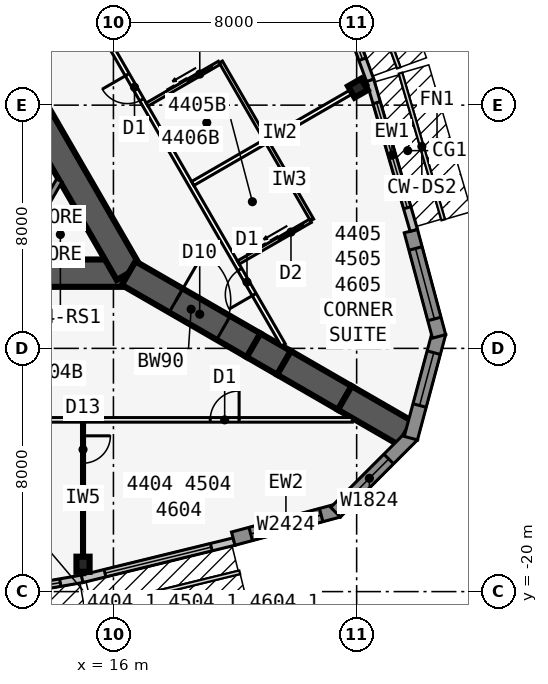
"""IFC4 building model, lengths in metres.
Left out: names, types, materials, properties, quantities, classifications, styles, units other than length and angle.
Written with IfcOpenShell. Run it as: python <this file> out.ifc"""

import sys

from ifc_helpers import new_model, si_unit, direction, frame, frame_2d, origin, origin_2d, place, context, subcontext, project, spatial, polyline, rectangle, i_section, outline, extrude, element, fill, save


model = new_model("IFC4")
c1 = context("Model", 3, precision=1e-05, world=origin(), true_north=direction((0.0, 1.0)))
c2 = subcontext(c1, "Body", "Model", "MODEL_VIEW")
j1 = project(units=[si_unit("LENGTHUNIT", "METRE"), si_unit("PLANEANGLEUNIT", "RADIAN")], contexts=[c1])
p1 = place(None, origin())
s1 = spatial("IfcSite", under=j1, at=p1, CompositionType="ELEMENT")
p2 = place(p1, origin())
s2 = spatial("IfcBuilding", under=s1, at=p2, CompositionType="ELEMENT")
p3 = place(p2, frame((0.0, 0.0, 165.7)))
s3 = spatial("IfcBuildingStorey", under=s2, at=p3, CompositionType="ELEMENT", Elevation=165.7)
p4 = place(p3, frame((-16.5, -9.526, 0.0), z_axis=(0.0, 0.0, 1.0), x_axis=(1.0, 0.0, 0.0)))
e1 = element("IfcWall", 1, at=p4, inside=s3, PredefinedType="SHEAR", context=c2, shape_type="SweptSolid", body=[
    extrude(rectangle(XDim=33.0, YDim=0.9, at=frame_2d((16.5, 0.0))), origin(), (0.0, 0.0, 1.0), 3.4),
])
p5 = place(p4, frame((14.05, 0.0, 0.0)))
e2 = element("IfcOpeningElement", 2, at=p5, cuts=e1, PredefinedType="OPENING", context=c2, shape_type="SweptSolid", body=[
    extrude(rectangle(XDim=1.8, YDim=2.13, at=frame_2d((0.9, 1.065))), frame((0.0, 0.46, 0.0), z_axis=(0.0, -1.0, 0.0), x_axis=(1.0, 0.0, 0.0)), (0.0, 0.0, 1.0), 0.92),
])
p6 = place(p3, frame((16.5, -9.526, 0.0), z_axis=(0.0, 0.0, 1.0), x_axis=(-0.499999749417, 0.866025548458, 0.0)))
e3 = element("IfcWall", 3, at=p6, inside=s3, PredefinedType="SHEAR", context=c2, shape_type="SweptSolid", body=[
    extrude(rectangle(XDim=33.0, YDim=0.9, at=frame_2d((16.5, 0.0))), origin(), (0.0, 0.0, 1.0), 3.4),
])
p7 = place(p6, frame((14.15, 0.0, 0.0)))
e4 = element("IfcOpeningElement", 4, at=p7, cuts=e3, PredefinedType="OPENING", context=c2, shape_type="SweptSolid", body=[
    extrude(rectangle(XDim=1.8, YDim=2.13, at=frame_2d((0.9, 1.065))), frame((0.0, 0.46, 0.0), z_axis=(0.0, -1.0, 0.0), x_axis=(1.0, 0.0, 0.0)), (0.0, 0.0, 1.0), 0.92),
])
p8 = place(p6, frame((12.6, 0.0, 0.0)))
e5 = element("IfcOpeningElement", 5, at=p8, cuts=e3, PredefinedType="OPENING", context=c2, shape_type="SweptSolid", body=[
    extrude(rectangle(XDim=1.0, YDim=2.13, at=frame_2d((0.5, 1.065))), frame((0.0, 0.46, 0.0), z_axis=(0.0, -1.0, 0.0), x_axis=(1.0, 0.0, 0.0)), (0.0, 0.0, 1.0), 0.92),
])
p9 = place(p3, frame((16.5, -9.526, 0.0), z_axis=(0.0, 0.0, 1.0), x_axis=(0.866031398331, -0.499989616998, 0.0)))
e6 = element("IfcWall", 6, at=p9, inside=s3, PredefinedType="SHEAR", context=c2, shape_type="SweptSolid", body=[
    extrude(rectangle(XDim=4.746, YDim=0.9, at=frame_2d((2.373, 0.0))), origin(), (0.0, 0.0, 1.0), 3.4),
])
p10 = place(p9, frame((1.8, 0.0, 0.0)))
e7 = element("IfcOpeningElement", 7, at=p10, cuts=e6, PredefinedType="OPENING", context=c2, shape_type="SweptSolid", body=[
    extrude(rectangle(XDim=1.8, YDim=2.13, at=frame_2d((0.9, 1.065))), frame((0.0, 0.46, 0.0), z_axis=(0.0, -1.0, 0.0), x_axis=(1.0, 0.0, 0.0)), (0.0, 0.0, 1.0), 0.92),
])
p11 = place(p3, frame((20.61, -11.899, 0.0), z_axis=(0.0, 0.0, 1.0), x_axis=(0.866009537788, -0.500027479704, 0.0)))
e8 = element("IfcWall", 8, at=p11, inside=s3, PredefinedType="SHEAR", context=c2, shape_type="SweptSolid", body=[
    extrude(rectangle(XDim=1.155, YDim=0.9, at=frame_2d((0.577, 0.0))), origin(), (0.0, 0.0, 1.0), 3.4),
])
for number, where, z_axis, x_axis in (
    (9, (21.61, -12.477, 0.0), (0.0, 0.0, 1.0), (0.866, -0.5, 0.0)),
    (10, (23.61, -13.631, 0.0), (0.0, 0.0, 1.0), (0.866, -0.5, 0.0)),
):
    element("IfcWall", number, at=place(p3, frame(where, z_axis=z_axis, x_axis=x_axis)), inside=s3, PredefinedType="SHEAR", context=c2, shape_type="SweptSolid", body=[
        extrude(rectangle(XDim=2.309, YDim=0.9, at=frame_2d((1.155, 0.0))), origin(), (0.0, 0.0, 1.0), 3.4),
    ])
for number, where, z_axis, x_axis in (
    (11, (15.0, -19.1, 0.0), (0.0, 0.0, 1.0), (1.0, 0.0, 0.0)),
    (12, (24.041, -3.44, 0.0), (0.0, 0.0, 1.0), (-0.5, 0.866, 0.0)),
):
    element("IfcColumn", number, at=place(p3, frame(where, z_axis=z_axis, x_axis=x_axis)), inside=s3, PredefinedType="COLUMN", context=c2, shape_type="SweptSolid", body=[
        extrude(i_section(OverallWidth=0.432, OverallDepth=0.498, WebThickness=0.056, FlangeThickness=0.089, at=origin_2d()), origin(), (0.0, 0.0, 1.0), 3.4),
    ])
p12 = place(p3, frame((9.979, -20.452, 0.0), z_axis=(0.0, 0.0, 1.0), x_axis=(0.985030467156, 0.172380331752, 0.0)))
e13 = element("IfcWall", 13, at=p12, inside=s3, PredefinedType="STANDARD", context=c2, shape_type="SweptSolid", body=[
    extrude(rectangle(XDim=5.076, YDim=0.25, at=frame_2d((2.538, 0.0))), origin(), (0.0, 0.0, 1.0), 3.235),
])
p13 = place(p12, frame((0.738, 0.0, 0.45)))
e14 = element("IfcOpeningElement", 14, at=p13, cuts=e13, PredefinedType="OPENING", context=c2, shape_type="SweptSolid", body=[
    extrude(rectangle(XDim=3.6, YDim=2.4, at=frame_2d((1.8, 1.2))), frame((0.0, 0.135, 0.0), z_axis=(0.0, -1.0, 0.0), x_axis=(1.0, 0.0, 0.0)), (0.0, 0.0, 1.0), 0.27),
])
p14 = place(p3, frame((14.97, -19.579, 0.0), z_axis=(0.0, 0.0, 1.0), x_axis=(0.971270024053, 0.237980126011, 0.0)))
e15 = element("IfcWall", 15, at=p14, inside=s3, PredefinedType="STANDARD", context=c2, shape_type="SweptSolid", body=[
    extrude(rectangle(XDim=5.148, YDim=0.25, at=frame_2d((2.574, 0.0))), origin(), (0.0, 0.0, 1.0), 3.235),
])
p15 = place(p14, frame((0.774, 0.0, 0.45)))
e16 = element("IfcOpeningElement", 16, at=p15, cuts=e15, PredefinedType="OPENING", context=c2, shape_type="SweptSolid", body=[
    extrude(rectangle(XDim=3.6, YDim=2.4, at=frame_2d((1.8, 1.2))), frame((0.0, 0.135, 0.0), z_axis=(0.0, -1.0, 0.0), x_axis=(1.0, 0.0, 0.0)), (0.0, 0.0, 1.0), 0.27),
])
p16 = place(p3, frame((19.942, -18.258, 0.0), z_axis=(0.0, 0.0, 1.0), x_axis=(0.965924653531, 0.258823421857, 0.0)))
e17 = element("IfcWall", 17, at=p16, inside=s3, PredefinedType="SOLIDWALL", context=c2, shape_type="SweptSolid", body=[
    extrude(rectangle(XDim=3.586, YDim=0.45, at=frame_2d((1.793, 0.0))), origin(), (0.0, 0.0, 1.0), 3.235),
])
p17 = place(p16, frame((0.593, 0.0, 0.45)))
e18 = element("IfcOpeningElement", 18, at=p17, cuts=e17, PredefinedType="OPENING", context=c2, shape_type="SweptSolid", body=[
    extrude(rectangle(XDim=2.4, YDim=2.4, at=frame_2d((1.2, 1.2))), frame((0.0, 0.235, 0.0), z_axis=(0.0, -1.0, 0.0), x_axis=(1.0, 0.0, 0.0)), (0.0, 0.0, 1.0), 0.47),
])
p18 = place(p3, frame((23.305, -17.388, 0.0), z_axis=(0.0, 0.0, 1.0), x_axis=(0.707106781187, 0.707106781187, 0.0)))
e19 = element("IfcWall", 19, at=p18, inside=s3, PredefinedType="SOLIDWALL", context=c2, shape_type="SweptSolid", body=[
    extrude(outline(polyline([(3.586, 0.225), (3.527, 0.225), (3.035, 0.093), (3.0, 0.225), (0.0, 0.225), (0.0, -0.225), (3.586, -0.225), (3.586, 0.225)])), origin(), (0.0, 0.0, 1.0), 3.235),
])
p19 = place(p18, frame((0.675, 0.0, 0.45)))
e20 = element("IfcOpeningElement", 20, at=p19, cuts=e19, PredefinedType="OPENING", context=c2, shape_type="SweptSolid", body=[
    extrude(rectangle(XDim=1.8, YDim=2.4, at=frame_2d((0.9, 1.2))), frame((0.0, 0.235, 0.0), z_axis=(0.0, -1.0, 0.0), x_axis=(1.0, 0.0, 0.0)), (0.0, 0.0, 1.0), 0.47),
])
p20 = place(p3, frame((25.783, -14.953, 0.0), z_axis=(0.0, 0.0, 1.0), x_axis=(0.258823421857, 0.965924653531, 0.0)))
e21 = element("IfcWall", 21, at=p20, inside=s3, PredefinedType="SOLIDWALL", context=c2, shape_type="SweptSolid", body=[
    extrude(outline(polyline([(3.586, 0.225), (0.586, 0.225), (0.551, 0.093), (0.06, 0.225), (0.0, 0.225), (0.0, -0.225), (3.586, -0.225), (3.586, 0.225)])), origin(), (0.0, 0.0, 1.0), 3.235),
])
p21 = place(p20, frame((1.111, 0.0, 0.45)))
e22 = element("IfcOpeningElement", 22, at=p21, cuts=e21, PredefinedType="OPENING", context=c2, shape_type="SweptSolid", body=[
    extrude(rectangle(XDim=1.8, YDim=2.4, at=frame_2d((0.9, 1.2))), frame((0.0, 0.235, 0.0), z_axis=(0.0, -1.0, 0.0), x_axis=(1.0, 0.0, 0.0)), (0.0, 0.0, 1.0), 0.47),
])
p22 = place(p3, frame((26.711, -11.605, 0.0), z_axis=(0.0, 0.0, 1.0), x_axis=(-0.258823421857, 0.965924653531, 0.0)))
e23 = element("IfcWall", 23, at=p22, inside=s3, PredefinedType="SOLIDWALL", context=c2, shape_type="SweptSolid", body=[
    extrude(rectangle(XDim=3.586, YDim=0.45, at=frame_2d((1.793, 0.0))), origin(), (0.0, 0.0, 1.0), 3.235),
])
p23 = place(p22, frame((0.593, 0.0, 0.45)))
e24 = element("IfcOpeningElement", 24, at=p23, cuts=e23, PredefinedType="OPENING", context=c2, shape_type="SweptSolid", body=[
    extrude(rectangle(XDim=2.4, YDim=2.4, at=frame_2d((1.2, 1.2))), frame((0.0, 0.235, 0.0), z_axis=(0.0, -1.0, 0.0), x_axis=(1.0, 0.0, 0.0)), (0.0, 0.0, 1.0), 0.47),
])
p24 = place(p3, frame((25.88, -8.118, 0.0), z_axis=(0.0, 0.0, 1.0), x_axis=(-0.279528287117, 0.960137457191, 0.0)))
e25 = element("IfcWall", 25, at=p24, inside=s3, PredefinedType="STANDARD", context=c2, shape_type="SweptSolid", body=[
    extrude(rectangle(XDim=5.148, YDim=0.25, at=frame_2d((2.574, 0.0))), origin(), (0.0, 0.0, 1.0), 3.235),
])
p25 = place(p24, frame((0.774, 0.0, 0.45)))
e26 = element("IfcOpeningElement", 26, at=p25, cuts=e25, PredefinedType="OPENING", context=c2, shape_type="SweptSolid", body=[
    extrude(rectangle(XDim=3.6, YDim=2.4, at=frame_2d((1.8, 1.2))), frame((0.0, 0.135, 0.0), z_axis=(0.0, -1.0, 0.0), x_axis=(1.0, 0.0, 0.0)), (0.0, 0.0, 1.0), 0.27),
])
p26 = place(p3, frame((24.444, -3.183, 0.0), z_axis=(0.0, 0.0, 1.0), x_axis=(-0.343225593282, 0.939252996863, 0.0)))
e27 = element("IfcWall", 27, at=p26, inside=s3, PredefinedType="STANDARD", context=c2, shape_type="SweptSolid", body=[
    extrude(rectangle(XDim=5.076, YDim=0.25, at=frame_2d((2.538, 0.0))), origin(), (0.0, 0.0, 1.0), 3.235),
])
p27 = place(p26, frame((0.738, 0.0, 0.45)))
e28 = element("IfcOpeningElement", 28, at=p27, cuts=e27, PredefinedType="OPENING", context=c2, shape_type="SweptSolid", body=[
    extrude(rectangle(XDim=3.6, YDim=2.4, at=frame_2d((1.8, 1.2))), frame((0.0, 0.135, 0.0), z_axis=(0.0, -1.0, 0.0), x_axis=(1.0, 0.0, 0.0)), (0.0, 0.0, 1.0), 0.27),
])
p28 = place(p3, frame((-23.857, -14.351, 0.0), z_axis=(0.0, 0.0, 1.0), x_axis=(1.0, 0.0, 0.0)))
e29 = element("IfcWall", 29, at=p28, inside=s3, PredefinedType="PARTITIONING", context=c2, shape_type="SweptSolid", body=[
    extrude(rectangle(XDim=47.714, YDim=0.15, at=frame_2d((23.857, 0.0))), origin(), (0.0, 0.0, 1.0), 3.235),
])
p29 = place(p28, frame((4.682, 0.0, 0.0)))
e30 = element("IfcOpeningElement", 30, at=p29, cuts=e29, PredefinedType="OPENING", context=c2, shape_type="SweptSolid", body=[
    extrude(rectangle(XDim=0.95, YDim=2.13, at=frame_2d((0.475, 1.065))), frame((0.0, 0.085, 0.0), z_axis=(0.0, -1.0, 0.0), x_axis=(1.0, 0.0, 0.0)), (0.0, 0.0, 1.0), 0.17),
])
p30 = place(p28, frame((11.382, 0.0, 0.0)))
e31 = element("IfcOpeningElement", 31, at=p30, cuts=e29, PredefinedType="OPENING", context=c2, shape_type="SweptSolid", body=[
    extrude(rectangle(XDim=0.95, YDim=2.13, at=frame_2d((0.475, 1.065))), frame((0.0, 0.085, 0.0), z_axis=(0.0, -1.0, 0.0), x_axis=(1.0, 0.0, 0.0)), (0.0, 0.0, 1.0), 0.17),
])
p31 = place(p28, frame((23.357, 0.0, 0.0)))
e32 = element("IfcOpeningElement", 32, at=p31, cuts=e29, PredefinedType="OPENING", context=c2, shape_type="SweptSolid", body=[
    extrude(rectangle(XDim=1.0, YDim=2.13, at=frame_2d((0.5, 1.065))), frame((0.0, 0.085, 0.0), z_axis=(0.0, -1.0, 0.0), x_axis=(1.0, 0.0, 0.0)), (0.0, 0.0, 1.0), 0.17),
])
p32 = place(p28, frame((30.082, 0.0, 0.0)))
e33 = element("IfcOpeningElement", 33, at=p32, cuts=e29, PredefinedType="OPENING", context=c2, shape_type="SweptSolid", body=[
    extrude(rectangle(XDim=0.95, YDim=2.13, at=frame_2d((0.475, 1.065))), frame((0.0, 0.085, 0.0), z_axis=(0.0, -1.0, 0.0), x_axis=(1.0, 0.0, 0.0)), (0.0, 0.0, 1.0), 0.17),
])
p33 = place(p28, frame((43.041, 0.0, 0.0)))
e34 = element("IfcOpeningElement", 34, at=p33, cuts=e29, PredefinedType="OPENING", context=c2, shape_type="SweptSolid", body=[
    extrude(rectangle(XDim=0.95, YDim=2.13, at=frame_2d((0.475, 1.065))), frame((0.0, 0.085, 0.0), z_axis=(0.0, -1.0, 0.0), x_axis=(1.0, 0.0, 0.0)), (0.0, 0.0, 1.0), 0.17),
])
p34 = place(p3, frame((15.0, -14.426, 0.0), z_axis=(0.0, 0.0, 1.0), x_axis=(0.0, -1.0, 0.0)))
e35 = element("IfcWall", 35, at=p34, inside=s3, PredefinedType="PARTITIONING", context=c2, shape_type="SweptSolid", body=[
    extrude(rectangle(XDim=5.017, YDim=0.1, at=frame_2d((2.508, 0.0))), origin(), (0.0, 0.0, 1.0), 2.389),
])
p35 = place(p34, frame((0.45, 0.0, 0.0)))
e36 = element("IfcOpeningElement", 36, at=p35, cuts=e35, PredefinedType="OPENING", context=c2, shape_type="SweptSolid", body=[
    extrude(rectangle(XDim=0.9, YDim=2.13, at=frame_2d((0.45, 1.065))), frame((0.0, 0.06, 0.0), z_axis=(0.0, -1.0, 0.0), x_axis=(1.0, 0.0, 0.0)), (0.0, 0.0, 1.0), 0.12),
])
p36 = place(p3, frame((21.586, -11.885, 0.0), z_axis=(0.0, 0.0, 1.0), x_axis=(-0.500001915564, 0.86602429783, 0.0)))
e37 = element("IfcWall", 37, at=p36, inside=s3, PredefinedType="PARTITIONING", context=c2, shape_type="SweptSolid", body=[
    extrude(rectangle(XDim=42.172, YDim=0.15, at=frame_2d((21.086, 0.0))), origin(), (0.0, 0.0, 1.0), 3.235),
])
p37 = place(p36, frame((1.911, 0.0, 0.0)))
e38 = element("IfcOpeningElement", 38, at=p37, cuts=e37, PredefinedType="OPENING", context=c2, shape_type="SweptSolid", body=[
    extrude(rectangle(XDim=0.95, YDim=2.13, at=frame_2d((0.475, 1.065))), frame((0.0, 0.085, 0.0), z_axis=(0.0, -1.0, 0.0), x_axis=(1.0, 0.0, 0.0)), (0.0, 0.0, 1.0), 0.17),
])
p38 = place(p36, frame((9.311, 0.0, 0.0)))
e39 = element("IfcOpeningElement", 39, at=p38, cuts=e37, PredefinedType="OPENING", context=c2, shape_type="SweptSolid", body=[
    extrude(rectangle(XDim=0.95, YDim=2.13, at=frame_2d((0.475, 1.065))), frame((0.0, 0.085, 0.0), z_axis=(0.0, -1.0, 0.0), x_axis=(1.0, 0.0, 0.0)), (0.0, 0.0, 1.0), 0.17),
])
p39 = place(p36, frame((14.611, 0.0, 0.0)))
e40 = element("IfcOpeningElement", 40, at=p39, cuts=e37, PredefinedType="OPENING", context=c2, shape_type="SweptSolid", body=[
    extrude(rectangle(XDim=0.95, YDim=2.13, at=frame_2d((0.475, 1.065))), frame((0.0, 0.085, 0.0), z_axis=(0.0, -1.0, 0.0), x_axis=(1.0, 0.0, 0.0)), (0.0, 0.0, 1.0), 0.17),
])
p40 = place(p36, frame((26.711, 0.0, 0.0)))
e41 = element("IfcOpeningElement", 41, at=p40, cuts=e37, PredefinedType="OPENING", context=c2, shape_type="SweptSolid", body=[
    extrude(rectangle(XDim=0.95, YDim=2.13, at=frame_2d((0.475, 1.065))), frame((0.0, 0.085, 0.0), z_axis=(0.0, -1.0, 0.0), x_axis=(1.0, 0.0, 0.0)), (0.0, 0.0, 1.0), 0.17),
])
p41 = place(p36, frame((38.884, 0.0, 0.0)))
e42 = element("IfcOpeningElement", 42, at=p41, cuts=e37, PredefinedType="OPENING", context=c2, shape_type="SweptSolid", body=[
    extrude(rectangle(XDim=0.95, YDim=2.13, at=frame_2d((0.475, 1.065))), frame((0.0, 0.085, 0.0), z_axis=(0.0, -1.0, 0.0), x_axis=(1.0, 0.0, 0.0)), (0.0, 0.0, 1.0), 0.17),
])
p42 = place(p3, frame((18.608, -6.577, 0.0), z_axis=(0.0, 0.0, 1.0), x_axis=(0.866031967744, 0.499988630717, 0.0)))
e43 = element("IfcWall", 43, at=p42, inside=s3, PredefinedType="PARTITIONING", context=c2, shape_type="SweptSolid", body=[
    extrude(rectangle(XDim=6.616, YDim=0.15, at=frame_2d((3.308, 0.0))), origin(), (0.0, 0.0, 1.0), 2.389),
])
p43 = place(p3, frame((22.533, -7.775, 0.0), z_axis=(0.0, 0.0, 1.0), x_axis=(-0.499990139034, 0.866031096941, 0.0)))
e44 = element("IfcWall", 44, at=p43, inside=s3, PredefinedType="PLUMBINGWALL", context=c2, shape_type="SweptSolid", body=[
    extrude(rectangle(XDim=3.0, YDim=0.12, at=frame_2d((1.5, 0.0))), origin(), (0.0, 0.0, 1.0), 3.235),
])
p44 = place(p3, frame((20.108, -9.175, 0.0), z_axis=(0.0, 0.0, 1.0), x_axis=(0.866035715982, 0.499982138324, 0.0)))
e45 = element("IfcWall", 45, at=p44, inside=s3, PredefinedType="PLUMBINGWALL", context=c2, shape_type="SweptSolid", body=[
    extrude(rectangle(XDim=2.74, YDim=0.12, at=frame_2d((1.37, 0.0))), origin(), (0.0, 0.0, 1.0), 3.235),
])
p45 = place(p44, frame((1.55, 0.0, 0.0)))
e46 = element("IfcOpeningElement", 46, at=p45, cuts=e45, PredefinedType="OPENING", context=c2, shape_type="SweptSolid", body=[
    extrude(rectangle(XDim=0.9, YDim=2.13, at=frame_2d((0.45, 1.065))), frame((0.0, 0.07, 0.0), z_axis=(0.0, -1.0, 0.0), x_axis=(1.0, 0.0, 0.0)), (0.0, 0.0, 1.0), 0.14),
])
p46 = place(p3, frame((21.033, -5.177, 0.0), z_axis=(0.0, 0.0, 1.0), x_axis=(-0.499990139034, 0.866031096941, 0.0)))
e47 = element("IfcWall", 47, at=p46, inside=s3, PredefinedType="PLUMBINGWALL", context=c2, shape_type="SweptSolid", body=[
    extrude(rectangle(XDim=3.0, YDim=0.12, at=frame_2d((1.5, 0.0))), origin(), (0.0, 0.0, 1.0), 3.235),
])
p47 = place(p3, frame((17.108, -3.979, 0.0), z_axis=(0.0, 0.0, 1.0), x_axis=(0.865997131366, 0.500048966069, 0.0)))
e48 = element("IfcWall", 48, at=p47, inside=s3, PredefinedType="PLUMBINGWALL", context=c2, shape_type="SweptSolid", body=[
    extrude(rectangle(XDim=2.74, YDim=0.12, at=frame_2d((1.37, 0.0))), origin(), (0.0, 0.0, 1.0), 3.235),
])
p48 = place(p47, frame((1.55, 0.0, 0.0)))
e49 = element("IfcOpeningElement", 49, at=p48, cuts=e48, PredefinedType="OPENING", context=c2, shape_type="SweptSolid", body=[
    extrude(rectangle(XDim=0.9, YDim=2.13, at=frame_2d((0.45, 1.065))), frame((0.0, 0.07, 0.0), z_axis=(0.0, -1.0, 0.0), x_axis=(1.0, 0.0, 0.0)), (0.0, 0.0, 1.0), 0.14),
])
p49 = place(p3, frame((14.219, -6.476, 0.0), z_axis=(0.0, 0.0, 1.0), x_axis=(-0.499952404951, -0.866052881055, 0.0)))
e50 = element("IfcWall", 50, at=p49, inside=s3, PredefinedType="SOLIDWALL", context=c2, shape_type="SweptSolid", body=[
    extrude(rectangle(XDim=3.002, YDim=0.2, at=frame_2d((1.501, 0.0))), origin(), (0.0, 0.0, 1.0), 3.235),
])
p50 = place(p13, origin())
e51 = element("IfcWindow", 51, at=p50, inside=s3, PartitioningType="SINGLE_PANEL", PredefinedType="WINDOW", context=c2, shape_type="SweptSolid", body=[
    extrude(rectangle(XDim=3.6, YDim=2.4, at=frame_2d((1.8, 1.2))), frame((0.0, 0.03, 0.0), z_axis=(0.0, -1.0, 0.0), x_axis=(1.0, 0.0, 0.0)), (0.0, 0.0, 1.0), 0.06),
])
fill(e14, e51)
p51 = place(p15, origin())
e52 = element("IfcWindow", 52, at=p51, inside=s3, PartitioningType="SINGLE_PANEL", PredefinedType="WINDOW", context=c2, shape_type="SweptSolid", body=[
    extrude(rectangle(XDim=3.6, YDim=2.4, at=frame_2d((1.8, 1.2))), frame((0.0, 0.03, 0.0), z_axis=(0.0, -1.0, 0.0), x_axis=(1.0, 0.0, 0.0)), (0.0, 0.0, 1.0), 0.06),
])
fill(e16, e52)
p52 = place(p17, origin())
e53 = element("IfcWindow", 53, at=p52, inside=s3, PartitioningType="SINGLE_PANEL", PredefinedType="WINDOW", context=c2, shape_type="SweptSolid", body=[
    extrude(rectangle(XDim=2.4, YDim=2.4, at=frame_2d((1.2, 1.2))), frame((0.0, 0.03, 0.0), z_axis=(0.0, -1.0, 0.0), x_axis=(1.0, 0.0, 0.0)), (0.0, 0.0, 1.0), 0.06),
])
fill(e18, e53)
p53 = place(p19, origin())
e54 = element("IfcWindow", 54, at=p53, inside=s3, PartitioningType="SINGLE_PANEL", PredefinedType="WINDOW", context=c2, shape_type="SweptSolid", body=[
    extrude(rectangle(XDim=1.8, YDim=2.4, at=frame_2d((0.9, 1.2))), frame((0.0, 0.03, 0.0), z_axis=(0.0, -1.0, 0.0), x_axis=(1.0, 0.0, 0.0)), (0.0, 0.0, 1.0), 0.06),
])
fill(e20, e54)
p54 = place(p21, origin())
e55 = element("IfcWindow", 55, at=p54, inside=s3, PartitioningType="SINGLE_PANEL", PredefinedType="WINDOW", context=c2, shape_type="SweptSolid", body=[
    extrude(rectangle(XDim=1.8, YDim=2.4, at=frame_2d((0.9, 1.2))), frame((0.0, 0.03, 0.0), z_axis=(0.0, -1.0, 0.0), x_axis=(1.0, 0.0, 0.0)), (0.0, 0.0, 1.0), 0.06),
])
fill(e22, e55)
p55 = place(p23, origin())
e56 = element("IfcWindow", 56, at=p55, inside=s3, PartitioningType="SINGLE_PANEL", PredefinedType="WINDOW", context=c2, shape_type="SweptSolid", body=[
    extrude(rectangle(XDim=2.4, YDim=2.4, at=frame_2d((1.2, 1.2))), frame((0.0, 0.03, 0.0), z_axis=(0.0, -1.0, 0.0), x_axis=(1.0, 0.0, 0.0)), (0.0, 0.0, 1.0), 0.06),
])
fill(e24, e56)
p56 = place(p25, origin())
e57 = element("IfcWindow", 57, at=p56, inside=s3, PartitioningType="SINGLE_PANEL", PredefinedType="WINDOW", context=c2, shape_type="SweptSolid", body=[
    extrude(rectangle(XDim=3.6, YDim=2.4, at=frame_2d((1.8, 1.2))), frame((0.0, 0.03, 0.0), z_axis=(0.0, -1.0, 0.0), x_axis=(1.0, 0.0, 0.0)), (0.0, 0.0, 1.0), 0.06),
])
fill(e26, e57)
p57 = place(p27, origin())
e58 = element("IfcWindow", 58, at=p57, inside=s3, PartitioningType="SINGLE_PANEL", PredefinedType="WINDOW", context=c2, shape_type="SweptSolid", body=[
    extrude(rectangle(XDim=3.6, YDim=2.4, at=frame_2d((1.8, 1.2))), frame((0.0, 0.03, 0.0), z_axis=(0.0, -1.0, 0.0), x_axis=(1.0, 0.0, 0.0)), (0.0, 0.0, 1.0), 0.06),
])
fill(e28, e58)
p58 = place(p35, origin())
e59 = element("IfcDoor", 59, at=p58, inside=s3, OperationType="SINGLE_SWING_LEFT", PredefinedType="DOOR", context=c2, shape_type="SweptSolid", body=[
    extrude(rectangle(XDim=0.9, YDim=2.13, at=frame_2d((0.45, 1.065))), frame((0.0, 0.025, 0.0), z_axis=(0.0, -1.0, 0.0), x_axis=(1.0, 0.0, 0.0)), (0.0, 0.0, 1.0), 0.05),
])
fill(e36, e59)
p59 = place(p33, origin())
e60 = element("IfcDoor", 60, at=p59, inside=s3, OperationType="SINGLE_SWING_RIGHT", PredefinedType="DOOR", context=c2, shape_type="SweptSolid", body=[
    extrude(rectangle(XDim=0.95, YDim=2.13, at=frame_2d((0.475, 1.065))), frame((0.0, 0.025, 0.0), z_axis=(0.0, -1.0, 0.0), x_axis=(1.0, 0.0, 0.0)), (0.0, 0.0, 1.0), 0.05),
])
fill(e34, e60)
p60 = place(p45, origin())
e61 = element("IfcDoor", 61, at=p60, inside=s3, OperationType="SLIDING_TO_LEFT", PredefinedType="DOOR", context=c2, shape_type="SweptSolid", body=[
    extrude(rectangle(XDim=0.9, YDim=2.13, at=frame_2d((0.45, 1.065))), frame((0.0, 0.025, 0.0), z_axis=(0.0, -1.0, 0.0), x_axis=(1.0, 0.0, 0.0)), (0.0, 0.0, 1.0), 0.05),
])
fill(e46, e61)
p61 = place(p37, origin())
e62 = element("IfcDoor", 62, at=p61, inside=s3, OperationType="SINGLE_SWING_LEFT", PredefinedType="DOOR", context=c2, shape_type="SweptSolid", body=[
    extrude(rectangle(XDim=0.95, YDim=2.13, at=frame_2d((0.475, 1.065))), frame((0.0, 0.025, 0.0), z_axis=(0.0, -1.0, 0.0), x_axis=(1.0, 0.0, 0.0)), (0.0, 0.0, 1.0), 0.05),
])
fill(e38, e62)
p62 = place(p48, origin())
e63 = element("IfcDoor", 63, at=p62, inside=s3, OperationType="SLIDING_TO_LEFT", PredefinedType="DOOR", context=c2, shape_type="SweptSolid", body=[
    extrude(rectangle(XDim=0.9, YDim=2.13, at=frame_2d((0.45, 1.065))), frame((0.0, 0.025, 0.0), z_axis=(0.0, -1.0, 0.0), x_axis=(1.0, 0.0, 0.0)), (0.0, 0.0, 1.0), 0.05),
])
fill(e49, e63)
p63 = place(p38, origin())
e64 = element("IfcDoor", 64, at=p63, inside=s3, OperationType="SINGLE_SWING_RIGHT", PredefinedType="DOOR", context=c2, shape_type="SweptSolid", body=[
    extrude(rectangle(XDim=0.95, YDim=2.13, at=frame_2d((0.475, 1.065))), frame((0.0, 0.025, 0.0), z_axis=(0.0, -1.0, 0.0), x_axis=(1.0, 0.0, 0.0)), (0.0, 0.0, 1.0), 0.05),
])
fill(e39, e64)
p64 = place(p10, origin())
e65 = element("IfcDoor", 65, at=p64, inside=s3, OperationType="DOUBLE_DOOR_DOUBLE_SWING", PredefinedType="DOOR", context=c2, shape_type="SweptSolid", body=[
    extrude(rectangle(XDim=1.8, YDim=2.13, at=frame_2d((0.9, 1.065))), frame((0.0, 0.025, 0.0), z_axis=(0.0, -1.0, 0.0), x_axis=(1.0, 0.0, 0.0)), (0.0, 0.0, 1.0), 0.05),
])
fill(e7, e65)
save(model, sys.argv[1])
